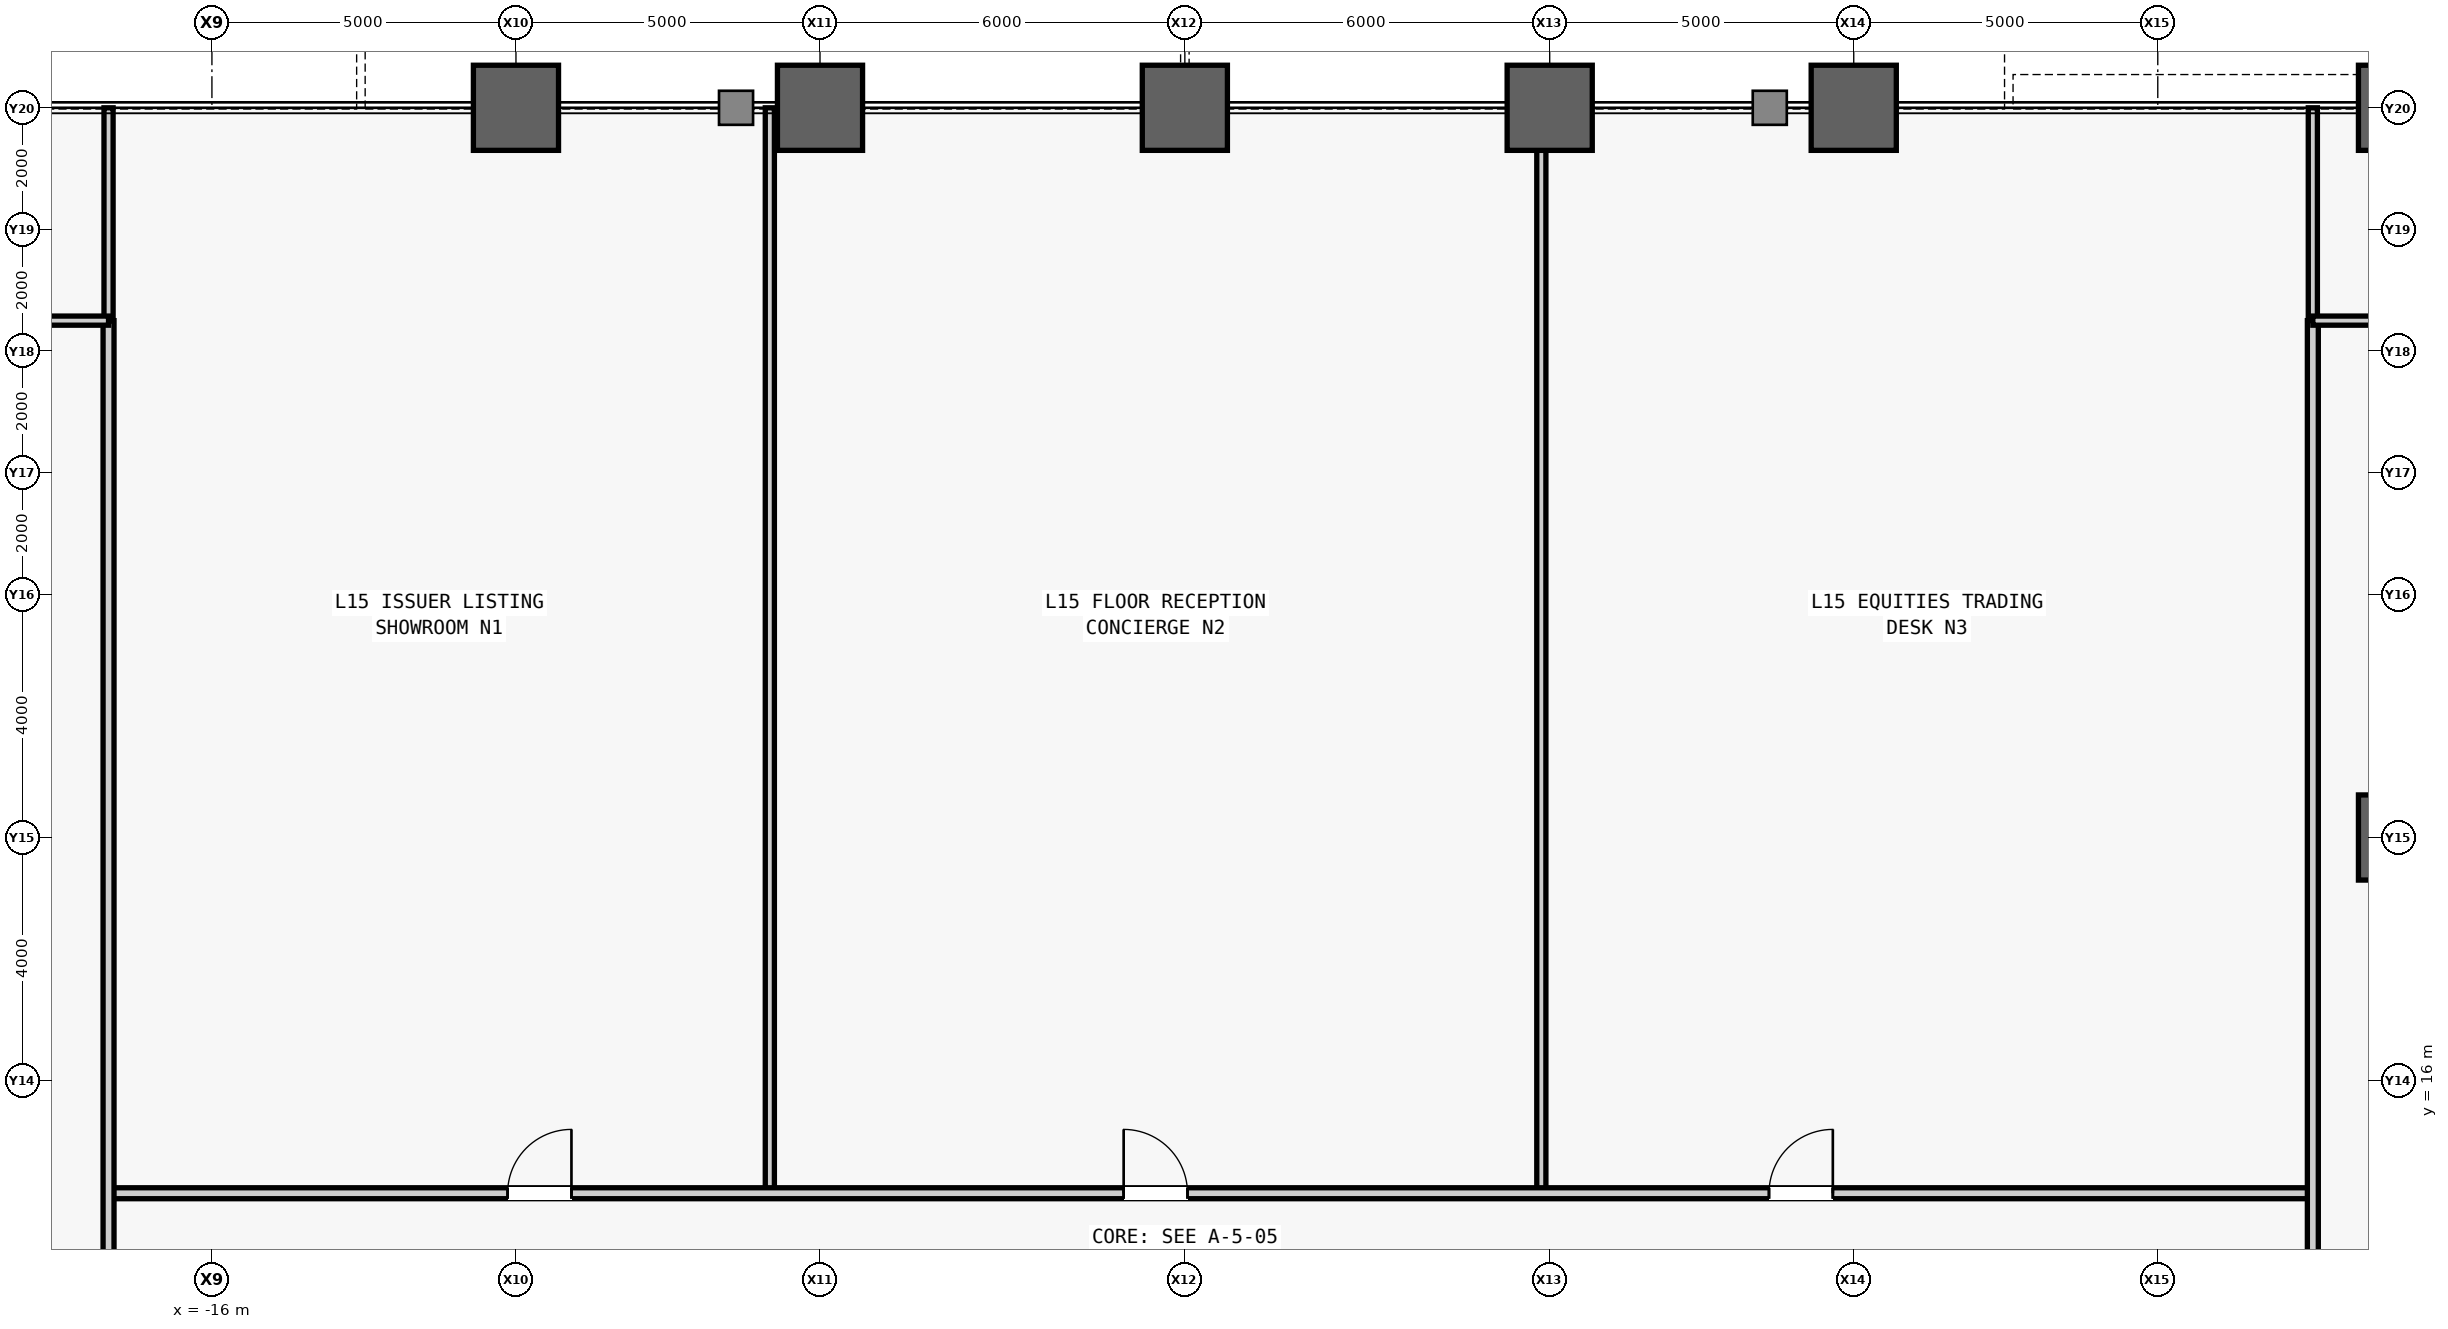
"""IFC4 building model, lengths in metres.
Left out: names, types, materials, properties, quantities, classifications, styles, units other than length and angle.
Written with IfcOpenShell. Run it as: python <this file> out.ifc"""

import sys

from ifc_helpers import new_model, si_unit, direction, frame, frame_2d, origin, origin_2d, place, context, subcontext, project, spatial, rectangle, hollow_rectangle, extrude, source, transform, mapped, element, fill, save


model = new_model("IFC4")
c1 = context("Model", 3, precision=1e-05, world=origin(), true_north=direction((0.0, 1.0)))
c2 = subcontext(c1, "Body", "Model", "MODEL_VIEW")
j1 = project(units=[si_unit("LENGTHUNIT", "METRE"), si_unit("PLANEANGLEUNIT", "RADIAN")], contexts=[c1])
p1 = place(None, origin())
s1 = spatial("IfcSite", under=j1, at=p1, CompositionType="ELEMENT")
p2 = place(p1, origin())
s2 = spatial("IfcBuilding", under=s1, at=p2, CompositionType="ELEMENT")
p3 = place(p2, frame((0.0, 0.0, 70.4)))
s3 = spatial("IfcBuildingStorey", under=s2, at=p3, CompositionType="ELEMENT", Elevation=70.4)
m1 = source(origin(), c2, "Body", "SweptSolid", [
    extrude(hollow_rectangle(XDim=1.4, YDim=1.4, WallThickness=0.075, at=origin_2d()), origin(), (0.0, 0.0, 1.0), 4.2),
])
for number, where, z_axis, x_axis in (
    (1, (-11.0, 32.0, 0.0), (0.0, 0.0, 1.0), (1.0, 0.0, 0.0)),
    (2, (-6.0, 32.0, 0.0), (0.0, 0.0, 1.0), (1.0, 0.0, 0.0)),
    (3, (0.0, 32.0, 0.0), (0.0, 0.0, 1.0), (1.0, 0.0, 0.0)),
    (4, (6.0, 32.0, 0.0), (0.0, 0.0, 1.0), (1.0, 0.0, 0.0)),
    (5, (11.0, 32.0, 0.0), (0.0, 0.0, 1.0), (1.0, 0.0, 0.0)),
    (6, (20.0, 20.0, 0.0), (0.0, 0.0, 1.0), (1.0, 0.0, 0.0)),
    (7, (20.0, 32.0, 0.0), (0.0, 0.0, 1.0), (1.0, 0.0, 0.0)),
):
    element("IfcColumn", number, at=place(p3, frame(where, z_axis=z_axis, x_axis=x_axis)), inside=s3, PredefinedType="COLUMN", context=c2, shape_type="MappedRepresentation", body=[
        mapped(m1, transform((0.0, 0.0, 0.0), scale=1.0)),
    ])
m2 = source(origin(), c2, "Body", "SweptSolid", [
    extrude(rectangle(XDim=17.85, YDim=0.15, at=frame_2d((8.925, 0.0))), origin(), (0.0, 0.0, 1.0), 3.94),
])
p4 = place(p3, frame((-6.825, 14.15, 0.0), z_axis=(0.0, 0.0, 1.0), x_axis=(0.0, 1.0, 0.0)))
e8 = element("IfcWall", 8, at=p4, inside=s3, PredefinedType="PARTITIONING", context=c2, shape_type="MappedRepresentation", body=[
    mapped(m2, transform((0.0, 0.0, 0.0), scale=1.0)),
])
m3 = source(origin(), c2, "Body", "SweptSolid", [
    extrude(rectangle(XDim=17.85, YDim=0.15, at=frame_2d((8.925, 0.0))), origin(), (0.0, 0.0, 1.0), 3.085),
])
p5 = place(p3, frame((5.863, 14.15, 0.0), z_axis=(0.0, 0.0, 1.0), x_axis=(0.0, 1.0, 0.0)))
e9 = element("IfcWall", 9, at=p5, inside=s3, PredefinedType="PARTITIONING", context=c2, shape_type="MappedRepresentation", body=[
    mapped(m3, transform((0.0, 0.0, 0.0), scale=1.0)),
])
m4 = source(origin(), c2, "Body", "SweptSolid", [
    extrude(rectangle(XDim=36.25, YDim=0.18, at=frame_2d((18.125, 0.0))), origin(), (0.0, 0.0, 1.0), 3.94),
])
p6 = place(p3, frame((-17.7, 14.15, 0.0), z_axis=(0.0, 0.0, 1.0), x_axis=(1.0, 0.0, 0.0)))
e10 = element("IfcWall", 10, at=p6, inside=s3, PredefinedType="PARTITIONING", context=c2, shape_type="MappedRepresentation", body=[
    mapped(m4, transform((0.0, 0.0, 0.0), scale=1.0)),
])
m5 = source(origin(), c2, "Body", "SweptSolid", [
    extrude(rectangle(XDim=1.05, YDim=2.2, at=frame_2d((0.525, 1.1))), frame((0.0, 0.1, 0.0), z_axis=(0.0, -1.0, 0.0), x_axis=(1.0, 0.0, 0.0)), (0.0, 0.0, 1.0), 0.2),
])
p7 = place(p6, frame((6.562, 0.0, 0.0)))
e11 = element("IfcOpeningElement", 11, at=p7, cuts=e10, PredefinedType="OPENING", context=c2, shape_type="MappedRepresentation", body=[
    mapped(m5, transform((0.0, 0.0, 0.0), scale=1.0)),
])
p8 = place(p6, frame((16.694, 0.0, 0.0)))
e12 = element("IfcOpeningElement", 12, at=p8, cuts=e10, PredefinedType="OPENING", context=c2, shape_type="MappedRepresentation", body=[
    mapped(m5, transform((0.0, 0.0, 0.0), scale=1.0)),
])
p9 = place(p6, frame((27.306, 0.0, 0.0)))
e13 = element("IfcOpeningElement", 13, at=p9, cuts=e10, PredefinedType="OPENING", context=c2, shape_type="MappedRepresentation", body=[
    mapped(m5, transform((0.0, 0.0, 0.0), scale=1.0)),
])
m6 = source(origin(), c2, "Body", "SweptSolid", [
    extrude(rectangle(XDim=3.5, YDim=0.15, at=frame_2d((1.75, 0.0))), origin(), (0.0, 0.0, 1.0), 3.94),
])
for number, where, z_axis, x_axis in (
    (14, (-17.7, 28.5, 0.0), (0.0, 0.0, 1.0), (0.0, 1.0, 0.0)),
    (15, (18.55, 28.5, 0.0), (0.0, 0.0, 1.0), (0.0, 1.0, 0.0)),
):
    element("IfcWall", number, at=place(p3, frame(where, z_axis=z_axis, x_axis=x_axis)), inside=s3, PredefinedType="PARTITIONING", context=c2, shape_type="MappedRepresentation", body=[
        mapped(m6, transform((0.0, 0.0, 0.0), scale=1.0)),
    ])
m7 = source(origin(), c2, "Body", "SweptSolid", [
    extrude(rectangle(XDim=57.0, YDim=0.18, at=frame_2d((28.5, 0.0))), origin(), (0.0, 0.0, 1.0), 3.94),
])
p10 = place(p3, frame((-17.7, -28.5, 0.0), z_axis=(0.0, 0.0, 1.0), x_axis=(0.0, 1.0, 0.0)))
e16 = element("IfcWall", 16, at=p10, inside=s3, PredefinedType="PARTITIONING", context=c2, shape_type="MappedRepresentation", body=[
    mapped(m7, transform((0.0, 0.0, 0.0), scale=1.0)),
])
m8 = source(origin(), c2, "Body", "SweptSolid", [
    extrude(rectangle(XDim=0.95, YDim=2.15, at=frame_2d((0.475, 1.075))), frame((0.0, 0.1, 0.0), z_axis=(0.0, -1.0, 0.0), x_axis=(1.0, 0.0, 0.0)), (0.0, 0.0, 1.0), 0.2),
])
p11 = place(p10, frame((21.663, 0.0, 0.0)))
e17 = element("IfcOpeningElement", 17, at=p11, cuts=e16, PredefinedType="OPENING", context=c2, shape_type="MappedRepresentation", body=[
    mapped(m8, transform((0.0, 0.0, 0.0), scale=1.0)),
])
p12 = place(p10, frame((34.938, 0.0, 0.0)))
e18 = element("IfcOpeningElement", 18, at=p12, cuts=e16, PredefinedType="OPENING", context=c2, shape_type="MappedRepresentation", body=[
    mapped(m8, transform((0.0, 0.0, 0.0), scale=1.0)),
])
p13 = place(p3, frame((18.55, -28.5, 0.0), z_axis=(0.0, 0.0, 1.0), x_axis=(0.0, 1.0, 0.0)))
e19 = element("IfcWall", 19, at=p13, inside=s3, PredefinedType="PARTITIONING", context=c2, shape_type="MappedRepresentation", body=[
    mapped(m7, transform((0.0, 0.0, 0.0), scale=1.0)),
])
p14 = place(p13, frame((17.222, 0.0, 0.0)))
e20 = element("IfcOpeningElement", 20, at=p14, cuts=e19, PredefinedType="OPENING", context=c2, shape_type="MappedRepresentation", body=[
    mapped(m8, transform((0.0, 0.0, 0.0), scale=1.0)),
])
p15 = place(p13, frame((22.472, 0.0, 0.0)))
e21 = element("IfcOpeningElement", 21, at=p15, cuts=e19, PredefinedType="OPENING", context=c2, shape_type="MappedRepresentation", body=[
    mapped(m8, transform((0.0, 0.0, 0.0), scale=1.0)),
])
p16 = place(p13, frame((28.855, 0.0, 0.0)))
e22 = element("IfcOpeningElement", 22, at=p16, cuts=e19, PredefinedType="OPENING", context=c2, shape_type="MappedRepresentation", body=[
    mapped(m8, transform((0.0, 0.0, 0.0), scale=1.0)),
])
p17 = place(p13, frame((34.96, 0.0, 0.0)))
e23 = element("IfcOpeningElement", 23, at=p17, cuts=e19, PredefinedType="OPENING", context=c2, shape_type="MappedRepresentation", body=[
    mapped(m8, transform((0.0, 0.0, 0.0), scale=1.0)),
])
p18 = place(p13, frame((39.655, 0.0, 0.0)))
e24 = element("IfcOpeningElement", 24, at=p18, cuts=e19, PredefinedType="OPENING", context=c2, shape_type="MappedRepresentation", body=[
    mapped(m8, transform((0.0, 0.0, 0.0), scale=1.0)),
])
m9 = source(origin(), c2, "Body", "SweptSolid", [
    extrude(rectangle(XDim=10.8, YDim=0.15, at=frame_2d((5.4, 0.0))), origin(), (0.0, 0.0, 1.0), 3.94),
])
p19 = place(p3, frame((-28.5, 28.5, 0.0), z_axis=(0.0, 0.0, 1.0), x_axis=(1.0, 0.0, 0.0)))
e25 = element("IfcWall", 25, at=p19, inside=s3, PredefinedType="PARTITIONING", context=c2, shape_type="MappedRepresentation", body=[
    mapped(m9, transform((0.0, 0.0, 0.0), scale=1.0)),
])
m10 = source(origin(), c2, "Body", "SweptSolid", [
    extrude(rectangle(XDim=0.95, YDim=2.15, at=frame_2d((0.475, 1.075))), frame((0.0, 0.085, 0.0), z_axis=(0.0, -1.0, 0.0), x_axis=(1.0, 0.0, 0.0)), (0.0, 0.0, 1.0), 0.17),
])
p20 = place(p19, frame((4.925, 0.0, 0.0)))
e26 = element("IfcOpeningElement", 26, at=p20, cuts=e25, PredefinedType="OPENING", context=c2, shape_type="MappedRepresentation", body=[
    mapped(m10, transform((0.0, 0.0, 0.0), scale=1.0)),
])
m11 = source(origin(), c2, "Body", "SweptSolid", [
    extrude(rectangle(XDim=9.95, YDim=0.15, at=frame_2d((4.975, 0.0))), origin(), (0.0, 0.0, 1.0), 3.94),
])
p21 = place(p3, frame((18.55, 28.5, 0.0), z_axis=(0.0, 0.0, 1.0), x_axis=(1.0, 0.0, 0.0)))
e27 = element("IfcWall", 27, at=p21, inside=s3, PredefinedType="PARTITIONING", context=c2, shape_type="MappedRepresentation", body=[
    mapped(m11, transform((0.0, 0.0, 0.0), scale=1.0)),
])
p22 = place(p21, frame((4.5, 0.0, 0.0)))
e28 = element("IfcOpeningElement", 28, at=p22, cuts=e27, PredefinedType="OPENING", context=c2, shape_type="MappedRepresentation", body=[
    mapped(m10, transform((0.0, 0.0, 0.0), scale=1.0)),
])
m12 = source(origin(), c2, "Body", "SweptSolid", [
    extrude(rectangle(XDim=1.05, YDim=2.2, at=frame_2d((0.525, 1.1))), frame((0.0, 0.025, 0.0), z_axis=(0.0, -1.0, 0.0), x_axis=(1.0, 0.0, 0.0)), (0.0, 0.0, 1.0), 0.05),
])
p23 = place(p7, origin())
e29 = element("IfcDoor", 29, at=p23, inside=s3, OperationType="SINGLE_SWING_RIGHT", PredefinedType="DOOR", context=c2, shape_type="MappedRepresentation", body=[
    mapped(m12, transform((0.0, 0.0, 0.0), scale=1.0)),
])
fill(e11, e29)
p24 = place(p8, origin())
e30 = element("IfcDoor", 30, at=p24, inside=s3, OperationType="SINGLE_SWING_LEFT", PredefinedType="DOOR", context=c2, shape_type="MappedRepresentation", body=[
    mapped(m12, transform((0.0, 0.0, 0.0), scale=1.0)),
])
fill(e12, e30)
p25 = place(p9, origin())
e31 = element("IfcDoor", 31, at=p25, inside=s3, OperationType="SINGLE_SWING_RIGHT", PredefinedType="DOOR", context=c2, shape_type="MappedRepresentation", body=[
    mapped(m12, transform((0.0, 0.0, 0.0), scale=1.0)),
])
fill(e13, e31)
save(model, sys.argv[1])
